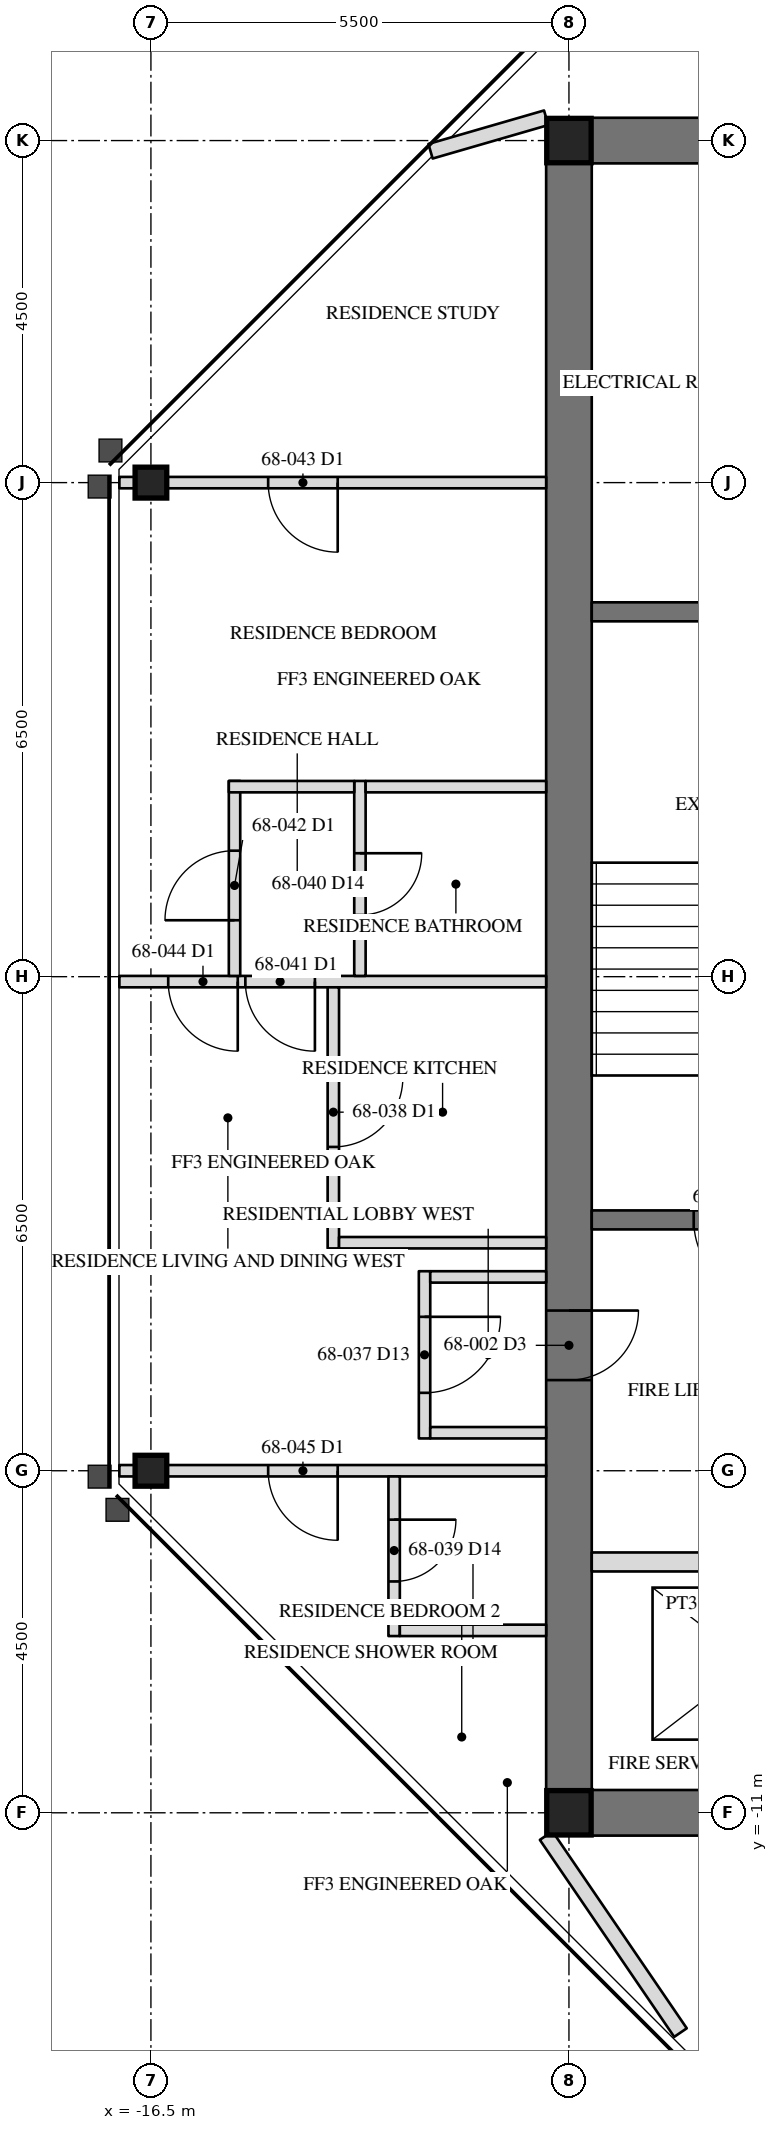
"""IFC4 building model, lengths in metres.
Left out: names, types, materials, properties, quantities, classifications, styles, units other than length and angle.
Written with IfcOpenShell. Run it as: python <this file> out.ifc"""

import sys

from ifc_helpers import new_model, si_unit, direction, frame, frame_2d, origin, origin_2d, place, context, subcontext, project, spatial, rectangle, hollow_rectangle, i_section, extrude, element, fill, save


model = new_model("IFC4")
c1 = context("Model", 3, precision=1e-05, world=origin(), true_north=direction((0.0, 1.0)))
c2 = subcontext(c1, "Body", "Model", "MODEL_VIEW")
j1 = project(units=[si_unit("LENGTHUNIT", "METRE"), si_unit("PLANEANGLEUNIT", "RADIAN")], contexts=[c1])
p1 = place(None, origin())
s1 = spatial("IfcSite", under=j1, at=p1, CompositionType="ELEMENT")
p2 = place(p1, origin())
s2 = spatial("IfcBuilding", under=s1, at=p2, CompositionType="ELEMENT")
p3 = place(p2, frame((0.0, 0.0, 277.6)))
s3 = spatial("IfcBuildingStorey", under=s2, at=p3, CompositionType="ELEMENT", Elevation=277.6)
for number, where, z_axis, x_axis in (
    (1, (-16.5, -6.5, 0.0), (0.0, 0.0, 1.0), (0.0, 1.0, 0.0)),
    (2, (-16.5, 6.5, 0.0), (0.0, 0.0, 1.0), (0.0, 1.0, 0.0)),
):
    element("IfcColumn", number, at=place(p3, frame(where, z_axis=z_axis, x_axis=x_axis)), inside=s3, PredefinedType="COLUMN", context=c2, shape_type="SweptSolid", body=[
        extrude(i_section(OverallWidth=0.406, OverallDepth=0.417, WebThickness=0.03, FlangeThickness=0.048, at=origin_2d()), origin(), (0.0, 0.0, 1.0), 3.6),
    ])
p4 = place(p3, frame((-11.0, 11.0, 0.0), z_axis=(0.0, 0.0, 1.0), x_axis=(0.0, -1.0, 0.0)))
e3 = element("IfcWall", 3, at=p4, inside=s3, PredefinedType="SHEAR", context=c2, shape_type="SweptSolid", body=[
    extrude(rectangle(XDim=22.0, YDim=0.6, at=frame_2d((11.0, 0.0))), origin(), (0.0, 0.0, 1.0), 3.6),
])
p5 = place(p4, frame((15.393, 0.0, 0.0)))
e4 = element("IfcOpeningElement", 4, at=p5, cuts=e3, PredefinedType="OPENING", context=c2, shape_type="SweptSolid", body=[
    extrude(rectangle(XDim=0.915, YDim=2.134, at=frame_2d((0.458, 1.067))), frame((0.0, 0.31, 0.0), z_axis=(0.0, -1.0, 0.0), x_axis=(1.0, 0.0, 0.0)), (0.0, 0.0, 1.0), 0.62),
])
for number, where, z_axis, x_axis in (
    (5, (-6.5, 11.0, 0.0), (0.0, 0.0, 1.0), (-1.0, 0.0, 0.0)),
    (6, (-11.0, -11.0, 0.0), (0.0, 0.0, 1.0), (1.0, 0.0, 0.0)),
):
    element("IfcWall", number, at=place(p3, frame(where, z_axis=z_axis, x_axis=x_axis)), inside=s3, PredefinedType="SHEAR", context=c2, shape_type="SweptSolid", body=[
        extrude(rectangle(XDim=4.5, YDim=0.6, at=frame_2d((2.25, 0.0))), origin(), (0.0, 0.0, 1.0), 3.6),
    ])
for number, where, z_axis, x_axis in (
    (7, (-11.0, 11.0, 0.0), (0.0, 0.0, 1.0), (1.0, 0.0, 0.0)),
    (8, (-11.0, -11.0, 0.0), (0.0, 0.0, 1.0), (1.0, 0.0, 0.0)),
):
    element("IfcColumn", number, at=place(p3, frame(where, z_axis=z_axis, x_axis=x_axis)), inside=s3, PredefinedType="COLUMN", context=c2, shape_type="SweptSolid", body=[
        extrude(hollow_rectangle(XDim=0.584, YDim=0.584, WallThickness=0.051, at=origin_2d()), origin(), (0.0, 0.0, 1.0), 3.6),
    ])
p6 = place(p3, frame((-6.95, 4.8, 0.0), z_axis=(0.0, 0.0, 1.0), x_axis=(-1.0, 0.0, 0.0)))
e9 = element("IfcWall", 9, at=p6, inside=s3, PredefinedType="SOLIDWALL", context=c2, shape_type="SweptSolid", body=[
    extrude(rectangle(XDim=3.75, YDim=0.25, at=frame_2d((1.875, 0.0))), origin(), (0.0, 0.0, 1.0), 3.41),
])
p7 = place(p3, frame((-6.95, -3.2, 0.0), z_axis=(0.0, 0.0, 1.0), x_axis=(-1.0, 0.0, 0.0)))
e10 = element("IfcWall", 10, at=p7, inside=s3, PredefinedType="SOLIDWALL", context=c2, shape_type="SweptSolid", body=[
    extrude(rectangle(XDim=3.75, YDim=0.25, at=frame_2d((1.875, 0.0))), origin(), (0.0, 0.0, 1.0), 3.41),
])
p8 = place(p7, frame((1.342, 0.0, 0.0)))
e11 = element("IfcOpeningElement", 11, at=p8, cuts=e10, PredefinedType="OPENING", context=c2, shape_type="SweptSolid", body=[
    extrude(rectangle(XDim=1.067, YDim=2.134, at=frame_2d((0.533, 1.067))), frame((0.0, 0.135, 0.0), z_axis=(0.0, -1.0, 0.0), x_axis=(1.0, 0.0, 0.0)), (0.0, 0.0, 1.0), 0.27),
])
p9 = place(p3, frame((-6.95, -7.7, 0.0), z_axis=(0.0, 0.0, 1.0), x_axis=(-1.0, 0.0, 0.0)))
e12 = element("IfcWall", 12, at=p9, inside=s3, PredefinedType="PARTITIONING", context=c2, shape_type="SweptSolid", body=[
    extrude(rectangle(XDim=3.75, YDim=0.25, at=frame_2d((1.875, 0.0))), origin(), (0.0, 0.0, 1.0), 3.41),
])
p10 = place(p9, frame((0.45, 0.0, 0.0)))
e13 = element("IfcOpeningElement", 13, at=p10, cuts=e12, PredefinedType="OPENING", context=c2, shape_type="SweptSolid", body=[
    extrude(rectangle(XDim=1.219, YDim=2.134, at=frame_2d((0.609, 1.067))), frame((0.0, 0.135, 0.0), z_axis=(0.0, -1.0, 0.0), x_axis=(1.0, 0.0, 0.0)), (0.0, 0.0, 1.0), 0.27),
])
p11 = place(p3, frame((-11.3, 11.3, 0.0), z_axis=(0.0, 0.0, 1.0), x_axis=(-0.960552344683, -0.278099250491, 0.0)))
e14 = element("IfcWall", 14, at=p11, inside=s3, PredefinedType="PARTITIONING", context=c2, shape_type="SweptSolid", body=[
    extrude(rectangle(XDim=1.584, YDim=0.2, at=frame_2d((0.792, 0.0))), origin(), (0.0, 0.0, 1.0), 3.41),
])
p12 = place(p3, frame((-11.3, -11.3, 0.0), z_axis=(0.0, 0.0, 1.0), x_axis=(0.563469639691, -0.826136771453, 0.0)))
e15 = element("IfcWall", 15, at=p12, inside=s3, PredefinedType="PARTITIONING", context=c2, shape_type="SweptSolid", body=[
    extrude(rectangle(XDim=3.137, YDim=0.2, at=frame_2d((1.568, 0.0))), origin(), (0.0, 0.0, 1.0), 2.704),
])
p13 = place(p3, frame((-11.3, 6.5, 0.0), z_axis=(0.0, 0.0, 1.0), x_axis=(-1.0, 0.0, 0.0)))
e16 = element("IfcWall", 16, at=p13, inside=s3, PredefinedType="PARTITIONING", context=c2, shape_type="SweptSolid", body=[
    extrude(rectangle(XDim=5.615, YDim=0.15, at=frame_2d((2.808, 0.0))), origin(), (0.0, 0.0, 1.0), 2.966),
])
p14 = place(p13, frame((2.742, 0.0, 0.0)))
e17 = element("IfcOpeningElement", 17, at=p14, cuts=e16, PredefinedType="OPENING", context=c2, shape_type="SweptSolid", body=[
    extrude(rectangle(XDim=0.915, YDim=2.134, at=frame_2d((0.458, 1.067))), frame((0.0, 0.085, 0.0), z_axis=(0.0, -1.0, 0.0), x_axis=(1.0, 0.0, 0.0)), (0.0, 0.0, 1.0), 0.17),
])
p15 = place(p3, frame((-11.3, -0.065, 0.0), z_axis=(0.0, 0.0, 1.0), x_axis=(-1.0, 0.0, 0.0)))
e18 = element("IfcWall", 18, at=p15, inside=s3, PredefinedType="PARTITIONING", context=c2, shape_type="SweptSolid", body=[
    extrude(rectangle(XDim=5.615, YDim=0.15, at=frame_2d((2.808, 0.0))), origin(), (0.0, 0.0, 1.0), 2.709),
])
p16 = place(p15, frame((3.042, 0.0, 0.0)))
e19 = element("IfcOpeningElement", 19, at=p16, cuts=e18, PredefinedType="OPENING", context=c2, shape_type="SweptSolid", body=[
    extrude(rectangle(XDim=0.915, YDim=2.134, at=frame_2d((0.458, 1.067))), frame((0.0, 0.085, 0.0), z_axis=(0.0, -1.0, 0.0), x_axis=(1.0, 0.0, 0.0)), (0.0, 0.0, 1.0), 0.17),
])
p17 = place(p15, frame((4.058, 0.0, 0.0)))
e20 = element("IfcOpeningElement", 20, at=p17, cuts=e18, PredefinedType="OPENING", context=c2, shape_type="SweptSolid", body=[
    extrude(rectangle(XDim=0.915, YDim=2.134, at=frame_2d((0.458, 1.067))), frame((0.0, 0.085, 0.0), z_axis=(0.0, -1.0, 0.0), x_axis=(1.0, 0.0, 0.0)), (0.0, 0.0, 1.0), 0.17),
])
p18 = place(p3, frame((-11.3, -6.5, 0.0), z_axis=(0.0, 0.0, 1.0), x_axis=(-1.0, 0.0, 0.0)))
e21 = element("IfcWall", 21, at=p18, inside=s3, PredefinedType="PARTITIONING", context=c2, shape_type="SweptSolid", body=[
    extrude(rectangle(XDim=5.615, YDim=0.15, at=frame_2d((2.808, 0.0))), origin(), (0.0, 0.0, 1.0), 2.966),
])
p19 = place(p18, frame((2.742, 0.0, 0.0)))
e22 = element("IfcOpeningElement", 22, at=p19, cuts=e21, PredefinedType="OPENING", context=c2, shape_type="SweptSolid", body=[
    extrude(rectangle(XDim=0.915, YDim=2.134, at=frame_2d((0.458, 1.067))), frame((0.0, 0.085, 0.0), z_axis=(0.0, -1.0, 0.0), x_axis=(1.0, 0.0, 0.0)), (0.0, 0.0, 1.0), 0.17),
])
p20 = place(p3, frame((-12.9, -3.875, 0.0), z_axis=(0.0, 0.0, 1.0), x_axis=(0.0, -1.0, 0.0)))
e23 = element("IfcWall", 23, at=p20, inside=s3, PredefinedType="PARTITIONING", context=c2, shape_type="SweptSolid", body=[
    extrude(rectangle(XDim=2.2, YDim=0.15, at=frame_2d((1.1, 0.0))), origin(), (0.0, 0.0, 1.0), 3.41),
])
p21 = place(p20, frame((0.6, 0.0, 0.0)))
e24 = element("IfcOpeningElement", 24, at=p21, cuts=e23, PredefinedType="OPENING", context=c2, shape_type="SweptSolid", body=[
    extrude(rectangle(XDim=1.0, YDim=2.134, at=frame_2d((0.5, 1.067))), frame((0.0, 0.085, 0.0), z_axis=(0.0, -1.0, 0.0), x_axis=(1.0, 0.0, 0.0)), (0.0, 0.0, 1.0), 0.17),
])
for number, where, z_axis, x_axis in (
    (25, (-11.3, -3.95, 0.0), (0.0, 0.0, 1.0), (-1.0, 0.0, 0.0)),
    (26, (-11.3, -6.0, 0.0), (0.0, 0.0, 1.0), (-1.0, 0.0, 0.0)),
):
    element("IfcWall", number, at=place(p3, frame(where, z_axis=z_axis, x_axis=x_axis)), inside=s3, PredefinedType="PARTITIONING", context=c2, shape_type="SweptSolid", body=[
        extrude(rectangle(XDim=1.525, YDim=0.15, at=frame_2d((0.762, 0.0))), origin(), (0.0, 0.0, 1.0), 3.41),
    ])
p22 = place(p3, frame((-14.1, -0.14, 0.0), z_axis=(0.0, 0.0, 1.0), x_axis=(0.0, -1.0, 0.0)))
e27 = element("IfcWall", 27, at=p22, inside=s3, PredefinedType="PARTITIONING", context=c2, shape_type="SweptSolid", body=[
    extrude(rectangle(XDim=3.435, YDim=0.15, at=frame_2d((1.718, 0.0))), origin(), (0.0, 0.0, 1.0), 3.41),
])
p23 = place(p22, frame((1.185, 0.0, 0.0)))
e28 = element("IfcOpeningElement", 28, at=p23, cuts=e27, PredefinedType="OPENING", context=c2, shape_type="SweptSolid", body=[
    extrude(rectangle(XDim=0.915, YDim=2.134, at=frame_2d((0.458, 1.067))), frame((0.0, 0.085, 0.0), z_axis=(0.0, -1.0, 0.0), x_axis=(1.0, 0.0, 0.0)), (0.0, 0.0, 1.0), 0.17),
])
p24 = place(p3, frame((-11.3, -3.5, 0.0), z_axis=(0.0, 0.0, 1.0), x_axis=(-1.0, 0.0, 0.0)))
e29 = element("IfcWall", 29, at=p24, inside=s3, PredefinedType="PARTITIONING", context=c2, shape_type="SweptSolid", body=[
    extrude(rectangle(XDim=2.725, YDim=0.15, at=frame_2d((1.362, 0.0))), origin(), (0.0, 0.0, 1.0), 3.41),
])
p25 = place(p3, frame((-13.3, -6.575, 0.0), z_axis=(0.0, 0.0, 1.0), x_axis=(0.0, -1.0, 0.0)))
e30 = element("IfcWall", 30, at=p25, inside=s3, PredefinedType="PARTITIONING", context=c2, shape_type="SweptSolid", body=[
    extrude(rectangle(XDim=2.1, YDim=0.15, at=frame_2d((1.05, 0.0))), origin(), (0.0, 0.0, 1.0), 3.41),
])
p26 = place(p25, frame((0.569, 0.0, 0.0)))
e31 = element("IfcOpeningElement", 31, at=p26, cuts=e30, PredefinedType="OPENING", context=c2, shape_type="SweptSolid", body=[
    extrude(rectangle(XDim=0.813, YDim=2.032, at=frame_2d((0.406, 1.016))), frame((0.0, 0.085, 0.0), z_axis=(0.0, -1.0, 0.0), x_axis=(1.0, 0.0, 0.0)), (0.0, 0.0, 1.0), 0.17),
])
p27 = place(p3, frame((-11.3, -8.6, 0.0), z_axis=(0.0, 0.0, 1.0), x_axis=(-1.0, 0.0, 0.0)))
e32 = element("IfcWall", 32, at=p27, inside=s3, PredefinedType="PARTITIONING", context=c2, shape_type="SweptSolid", body=[
    extrude(rectangle(XDim=1.925, YDim=0.15, at=frame_2d((0.962, 0.0))), origin(), (0.0, 0.0, 1.0), 3.41),
])
p28 = place(p3, frame((-13.75, 2.575, 0.0), z_axis=(0.0, 0.0, 1.0), x_axis=(0.0, -1.0, 0.0)))
e33 = element("IfcWall", 33, at=p28, inside=s3, PredefinedType="PARTITIONING", context=c2, shape_type="SweptSolid", body=[
    extrude(rectangle(XDim=2.565, YDim=0.15, at=frame_2d((1.282, 0.0))), origin(), (0.0, 0.0, 1.0), 3.41),
])
p29 = place(p28, frame((0.951, 0.0, 0.0)))
e34 = element("IfcOpeningElement", 34, at=p29, cuts=e33, PredefinedType="OPENING", context=c2, shape_type="SweptSolid", body=[
    extrude(rectangle(XDim=0.813, YDim=2.032, at=frame_2d((0.406, 1.016))), frame((0.0, 0.085, 0.0), z_axis=(0.0, -1.0, 0.0), x_axis=(1.0, 0.0, 0.0)), (0.0, 0.0, 1.0), 0.17),
])
p30 = place(p3, frame((-11.3, 2.5, 0.0), z_axis=(0.0, 0.0, 1.0), x_axis=(-1.0, 0.0, 0.0)))
e35 = element("IfcWall", 35, at=p30, inside=s3, PredefinedType="PARTITIONING", context=c2, shape_type="SweptSolid", body=[
    extrude(rectangle(XDim=2.375, YDim=0.15, at=frame_2d((1.188, 0.0))), origin(), (0.0, 0.0, 1.0), 3.41),
])
p31 = place(p3, frame((-15.4, 0.01, 0.0), z_axis=(0.0, 0.0, 1.0), x_axis=(0.0, 1.0, 0.0)))
e36 = element("IfcWall", 36, at=p31, inside=s3, PredefinedType="PARTITIONING", context=c2, shape_type="SweptSolid", body=[
    extrude(rectangle(XDim=2.565, YDim=0.15, at=frame_2d((1.282, 0.0))), origin(), (0.0, 0.0, 1.0), 3.41),
])
p32 = place(p31, frame((0.732, 0.0, 0.0)))
e37 = element("IfcOpeningElement", 37, at=p32, cuts=e36, PredefinedType="OPENING", context=c2, shape_type="SweptSolid", body=[
    extrude(rectangle(XDim=0.915, YDim=2.134, at=frame_2d((0.458, 1.067))), frame((0.0, 0.085, 0.0), z_axis=(0.0, -1.0, 0.0), x_axis=(1.0, 0.0, 0.0)), (0.0, 0.0, 1.0), 0.17),
])
p33 = place(p3, frame((-13.825, 2.5, 0.0), z_axis=(0.0, 0.0, 1.0), x_axis=(-1.0, 0.0, 0.0)))
e38 = element("IfcWall", 38, at=p33, inside=s3, PredefinedType="PARTITIONING", context=c2, shape_type="SweptSolid", body=[
    extrude(rectangle(XDim=1.65, YDim=0.15, at=frame_2d((0.825, 0.0))), origin(), (0.0, 0.0, 1.0), 3.41),
])
p34 = place(p5, origin())
e39 = element("IfcDoor", 39, at=p34, inside=s3, OperationType="SINGLE_SWING_RIGHT", PredefinedType="DOOR", context=c2, shape_type="SweptSolid", body=[
    extrude(rectangle(XDim=0.915, YDim=2.134, at=frame_2d((0.458, 1.067))), frame((0.0, -0.225, 0.0), z_axis=(0.0, -1.0, 0.0), x_axis=(1.0, 0.0, 0.0)), (0.0, 0.0, 1.0), 0.05),
])
fill(e4, e39)
p35 = place(p8, origin())
e40 = element("IfcDoor", 40, at=p35, inside=s3, OperationType="SINGLE_SWING_LEFT", PredefinedType="DOOR", context=c2, shape_type="SweptSolid", body=[
    extrude(rectangle(XDim=1.067, YDim=2.134, at=frame_2d((0.533, 1.067))), frame((0.0, 0.025, 0.0), z_axis=(0.0, -1.0, 0.0), x_axis=(1.0, 0.0, 0.0)), (0.0, 0.0, 1.0), 0.05),
])
fill(e11, e40)
p36 = place(p21, origin())
e41 = element("IfcDoor", 41, at=p36, inside=s3, OperationType="SINGLE_SWING_RIGHT", PredefinedType="DOOR", context=c2, shape_type="SweptSolid", body=[
    extrude(rectangle(XDim=1.0, YDim=2.134, at=frame_2d((0.5, 1.067))), frame((0.0, 0.025, 0.0), z_axis=(0.0, -1.0, 0.0), x_axis=(1.0, 0.0, 0.0)), (0.0, 0.0, 1.0), 0.05),
])
fill(e24, e41)
p37 = place(p23, origin())
e42 = element("IfcDoor", 42, at=p37, inside=s3, OperationType="SINGLE_SWING_LEFT", PredefinedType="DOOR", context=c2, shape_type="SweptSolid", body=[
    extrude(rectangle(XDim=0.915, YDim=2.134, at=frame_2d((0.458, 1.067))), frame((0.0, 0.025, 0.0), z_axis=(0.0, -1.0, 0.0), x_axis=(1.0, 0.0, 0.0)), (0.0, 0.0, 1.0), 0.05),
])
fill(e28, e42)
p38 = place(p26, origin())
e43 = element("IfcDoor", 43, at=p38, inside=s3, OperationType="SINGLE_SWING_LEFT", PredefinedType="DOOR", context=c2, shape_type="SweptSolid", body=[
    extrude(rectangle(XDim=0.813, YDim=2.032, at=frame_2d((0.406, 1.016))), frame((0.0, 0.025, 0.0), z_axis=(0.0, -1.0, 0.0), x_axis=(1.0, 0.0, 0.0)), (0.0, 0.0, 1.0), 0.05),
])
fill(e31, e43)
p39 = place(p29, origin())
e44 = element("IfcDoor", 44, at=p39, inside=s3, OperationType="SINGLE_SWING_LEFT", PredefinedType="DOOR", context=c2, shape_type="SweptSolid", body=[
    extrude(rectangle(XDim=0.813, YDim=2.032, at=frame_2d((0.406, 1.016))), frame((0.0, 0.025, 0.0), z_axis=(0.0, -1.0, 0.0), x_axis=(1.0, 0.0, 0.0)), (0.0, 0.0, 1.0), 0.05),
])
fill(e34, e44)
p40 = place(p16, origin())
e45 = element("IfcDoor", 45, at=p40, inside=s3, OperationType="SINGLE_SWING_LEFT", PredefinedType="DOOR", context=c2, shape_type="SweptSolid", body=[
    extrude(rectangle(XDim=0.915, YDim=2.134, at=frame_2d((0.458, 1.067))), frame((0.0, 0.025, 0.0), z_axis=(0.0, -1.0, 0.0), x_axis=(1.0, 0.0, 0.0)), (0.0, 0.0, 1.0), 0.05),
])
fill(e19, e45)
p41 = place(p32, origin())
e46 = element("IfcDoor", 46, at=p41, inside=s3, OperationType="SINGLE_SWING_LEFT", PredefinedType="DOOR", context=c2, shape_type="SweptSolid", body=[
    extrude(rectangle(XDim=0.915, YDim=2.134, at=frame_2d((0.458, 1.067))), frame((0.0, 0.025, 0.0), z_axis=(0.0, -1.0, 0.0), x_axis=(1.0, 0.0, 0.0)), (0.0, 0.0, 1.0), 0.05),
])
fill(e37, e46)
p42 = place(p14, origin())
e47 = element("IfcDoor", 47, at=p42, inside=s3, OperationType="SINGLE_SWING_LEFT", PredefinedType="DOOR", context=c2, shape_type="SweptSolid", body=[
    extrude(rectangle(XDim=0.915, YDim=2.134, at=frame_2d((0.458, 1.067))), frame((0.0, 0.025, 0.0), z_axis=(0.0, -1.0, 0.0), x_axis=(1.0, 0.0, 0.0)), (0.0, 0.0, 1.0), 0.05),
])
fill(e17, e47)
p43 = place(p17, origin())
e48 = element("IfcDoor", 48, at=p43, inside=s3, OperationType="SINGLE_SWING_LEFT", PredefinedType="DOOR", context=c2, shape_type="SweptSolid", body=[
    extrude(rectangle(XDim=0.915, YDim=2.134, at=frame_2d((0.458, 1.067))), frame((0.0, 0.025, 0.0), z_axis=(0.0, -1.0, 0.0), x_axis=(1.0, 0.0, 0.0)), (0.0, 0.0, 1.0), 0.05),
])
fill(e20, e48)
p44 = place(p19, origin())
e49 = element("IfcDoor", 49, at=p44, inside=s3, OperationType="SINGLE_SWING_LEFT", PredefinedType="DOOR", context=c2, shape_type="SweptSolid", body=[
    extrude(rectangle(XDim=0.915, YDim=2.134, at=frame_2d((0.458, 1.067))), frame((0.0, 0.025, 0.0), z_axis=(0.0, -1.0, 0.0), x_axis=(1.0, 0.0, 0.0)), (0.0, 0.0, 1.0), 0.05),
])
fill(e22, e49)
save(model, sys.argv[1])
